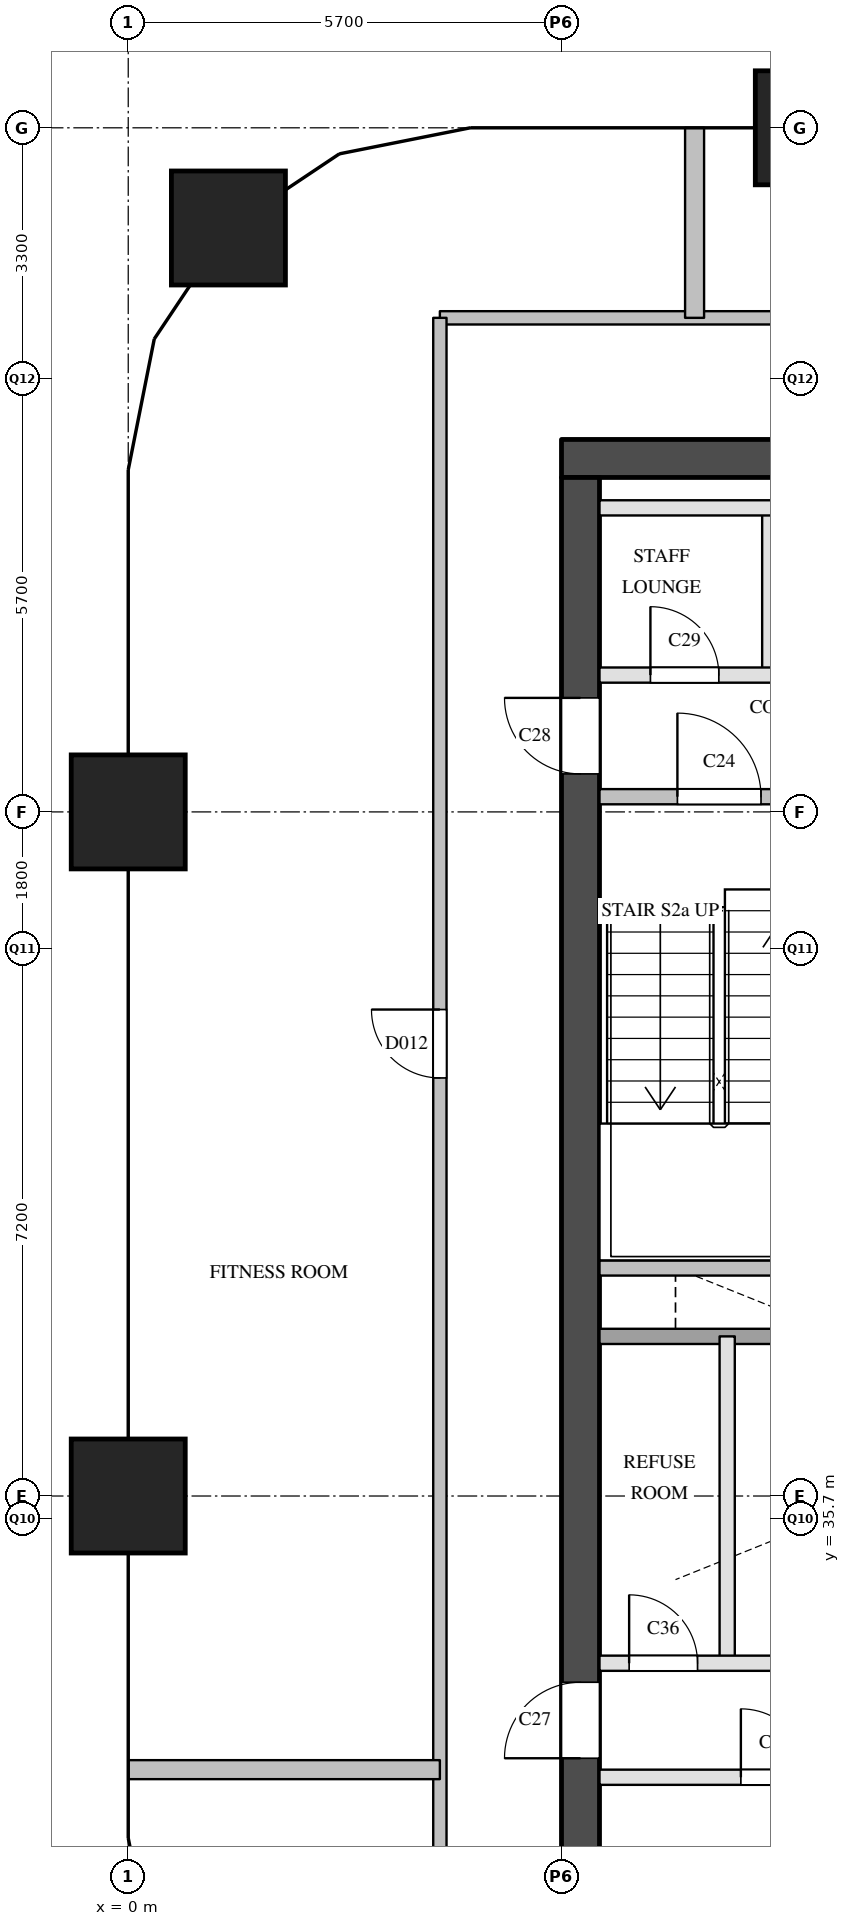
"""IFC4 building model, lengths in metres.
Left out: names, types, materials, properties, quantities, classifications, styles, units other than length and angle.
Written with IfcOpenShell. Run it as: python <this file> out.ifc"""

import sys

from ifc_helpers import new_model, si_unit, direction, frame, frame_2d, origin, origin_2d, place, context, subcontext, project, spatial, rectangle, extrude, element, fill, save


model = new_model("IFC4")
c1 = context("Model", 3, precision=1e-05, world=origin(), true_north=direction((0.0, 1.0)))
c2 = subcontext(c1, "Body", "Model", "MODEL_VIEW")
j1 = project(units=[si_unit("LENGTHUNIT", "METRE"), si_unit("PLANEANGLEUNIT", "RADIAN")], contexts=[c1])
p1 = place(None, origin())
s1 = spatial("IfcSite", under=j1, at=p1, CompositionType="ELEMENT")
p2 = place(p1, origin())
s2 = spatial("IfcBuilding", under=s1, at=p2, CompositionType="ELEMENT")
p3 = place(p2, frame((0.0, 0.0, 193.4)))
s3 = spatial("IfcBuildingStorey", under=s2, at=p3, CompositionType="ELEMENT", Elevation=193.4)
for number, where, z_axis, x_axis in (
    (1, (0.0, 36.0, 0.0), (0.0, 0.0, 1.0), (1.0, 0.0, 0.0)),
    (2, (0.0, 45.0, 0.0), (0.0, 0.0, 1.0), (1.0, 0.0, 0.0)),
    (3, (1.318, 52.682, 0.0), (0.0, 0.0, 1.0), (1.0, 0.0, 0.0)),
    (4, (9.0, 54.0, 0.0), (0.0, 0.0, 1.0), (1.0, 0.0, 0.0)),
):
    element("IfcColumn", number, at=place(p3, frame(where, z_axis=z_axis, x_axis=x_axis)), inside=s3, PredefinedType="COLUMN", context=c2, shape_type="SweptSolid", body=[
        extrude(rectangle(XDim=1.5, YDim=1.5, at=origin_2d()), origin(), (0.0, 0.0, 1.0), 3.9),
    ])
p4 = place(p3, frame((5.7, 49.65, 0.0), z_axis=(0.0, 0.0, 1.0), x_axis=(1.0, 0.0, 0.0)))
e5 = element("IfcWall", 5, at=p4, inside=s3, PredefinedType="SHEAR", context=c2, shape_type="SweptSolid", body=[
    extrude(rectangle(XDim=12.2, YDim=0.5, at=frame_2d((6.1, 0.0))), origin(), (0.0, 0.0, 1.0), 3.4),
])
p5 = place(p3, frame((5.95, 29.1, 0.0), z_axis=(0.0, 0.0, 1.0), x_axis=(0.0, 1.0, 0.0)))
e6 = element("IfcWall", 6, at=p5, inside=s3, PredefinedType="SHEAR", context=c2, shape_type="SweptSolid", body=[
    extrude(rectangle(XDim=20.3, YDim=0.5, at=frame_2d((10.15, 0.0))), origin(), (0.0, 0.0, 1.0), 3.4),
])
p6 = place(p5, frame((3.45, 0.0, 0.0)))
e7 = element("IfcOpeningElement", 7, at=p6, cuts=e6, PredefinedType="OPENING", context=c2, shape_type="SweptSolid", body=[
    extrude(rectangle(XDim=1.0, YDim=2.1, at=frame_2d((0.5, 1.05))), frame((0.0, 0.26, 0.0), z_axis=(0.0, -1.0, 0.0), x_axis=(1.0, 0.0, 0.0)), (0.0, 0.0, 1.0), 0.52),
])
p7 = place(p5, frame((16.4, 0.0, 0.0)))
e8 = element("IfcOpeningElement", 8, at=p7, cuts=e6, PredefinedType="OPENING", context=c2, shape_type="SweptSolid", body=[
    extrude(rectangle(XDim=1.0, YDim=2.1, at=frame_2d((0.5, 1.05))), frame((0.0, 0.26, 0.0), z_axis=(0.0, -1.0, 0.0), x_axis=(1.0, 0.0, 0.0)), (0.0, 0.0, 1.0), 0.52),
])
p8 = place(p3, frame((7.88, 33.8, 0.0), z_axis=(0.0, 0.0, 1.0), x_axis=(0.0, 1.0, 0.0)))
e9 = element("IfcWall", 9, at=p8, inside=s3, PredefinedType="PARTITIONING", context=c2, shape_type="SweptSolid", body=[
    extrude(rectangle(XDim=4.3, YDim=0.2, at=frame_2d((2.15, 0.0))), origin(), (0.0, 0.0, 1.0), 3.4),
])
p9 = place(p3, frame((8.44, 46.8, 0.0), z_axis=(0.0, 0.0, 1.0), x_axis=(0.0, 1.0, 0.0)))
e10 = element("IfcWall", 10, at=p9, inside=s3, PredefinedType="PARTITIONING", context=c2, shape_type="SweptSolid", body=[
    extrude(rectangle(XDim=2.2, YDim=0.2, at=frame_2d((1.1, 0.0))), origin(), (0.0, 0.0, 1.0), 3.4),
])
p10 = place(p3, frame((6.2, 32.3, 0.0), z_axis=(0.0, 0.0, 1.0), x_axis=(1.0, 0.0, 0.0)))
e11 = element("IfcWall", 11, at=p10, inside=s3, PredefinedType="PARTITIONING", context=c2, shape_type="SweptSolid", body=[
    extrude(rectangle(XDim=8.4, YDim=0.2, at=frame_2d((4.2, 0.0))), origin(), (0.0, 0.0, 1.0), 3.4),
])
p11 = place(p10, frame((1.86, 0.0, 0.0)))
e12 = element("IfcOpeningElement", 12, at=p11, cuts=e11, PredefinedType="OPENING", context=c2, shape_type="SweptSolid", body=[
    extrude(rectangle(XDim=0.9, YDim=2.1, at=frame_2d((0.45, 1.05))), frame((0.0, 0.11, 0.0), z_axis=(0.0, -1.0, 0.0), x_axis=(1.0, 0.0, 0.0)), (0.0, 0.0, 1.0), 0.22),
])
p12 = place(p10, frame((6.06, 0.0, 0.0)))
e13 = element("IfcOpeningElement", 13, at=p12, cuts=e11, PredefinedType="OPENING", context=c2, shape_type="SweptSolid", body=[
    extrude(rectangle(XDim=0.9, YDim=2.1, at=frame_2d((0.45, 1.05))), frame((0.0, 0.11, 0.0), z_axis=(0.0, -1.0, 0.0), x_axis=(1.0, 0.0, 0.0)), (0.0, 0.0, 1.0), 0.22),
])
p13 = place(p3, frame((6.2, 33.8, 0.0), z_axis=(0.0, 0.0, 1.0), x_axis=(1.0, 0.0, 0.0)))
e14 = element("IfcWall", 14, at=p13, inside=s3, PredefinedType="PARTITIONING", context=c2, shape_type="SweptSolid", body=[
    extrude(rectangle(XDim=8.4, YDim=0.2, at=frame_2d((4.2, 0.0))), origin(), (0.0, 0.0, 1.0), 3.4),
])
p14 = place(p13, frame((0.39, 0.0, 0.0)))
e15 = element("IfcOpeningElement", 15, at=p14, cuts=e14, PredefinedType="OPENING", context=c2, shape_type="SweptSolid", body=[
    extrude(rectangle(XDim=0.9, YDim=2.1, at=frame_2d((0.45, 1.05))), frame((0.0, 0.11, 0.0), z_axis=(0.0, -1.0, 0.0), x_axis=(1.0, 0.0, 0.0)), (0.0, 0.0, 1.0), 0.22),
])
p15 = place(p13, frame((4.59, 0.0, 0.0)))
e16 = element("IfcOpeningElement", 16, at=p15, cuts=e14, PredefinedType="OPENING", context=c2, shape_type="SweptSolid", body=[
    extrude(rectangle(XDim=0.9, YDim=2.1, at=frame_2d((0.45, 1.05))), frame((0.0, 0.11, 0.0), z_axis=(0.0, -1.0, 0.0), x_axis=(1.0, 0.0, 0.0)), (0.0, 0.0, 1.0), 0.22),
])
p16 = place(p3, frame((6.2, 38.1, 0.0), z_axis=(0.0, 0.0, 1.0), x_axis=(1.0, 0.0, 0.0)))
e17 = element("IfcWall", 17, at=p16, inside=s3, PredefinedType="SOLIDWALL", context=c2, shape_type="SweptSolid", body=[
    extrude(rectangle(XDim=11.2, YDim=0.2, at=frame_2d((5.6, 0.0))), origin(), (0.0, 0.0, 1.0), 3.4),
])
p17 = place(p16, frame((8.85, 0.0, 0.0)))
e18 = element("IfcOpeningElement", 18, at=p17, cuts=e17, PredefinedType="OPENING", context=c2, shape_type="SweptSolid", body=[
    extrude(rectangle(XDim=1.2, YDim=2.1, at=frame_2d((0.6, 1.05))), frame((0.0, 0.11, 0.0), z_axis=(0.0, -1.0, 0.0), x_axis=(1.0, 0.0, 0.0)), (0.0, 0.0, 1.0), 0.22),
])
p18 = place(p3, frame((6.2, 39.0, 0.0), z_axis=(0.0, 0.0, 1.0), x_axis=(1.0, 0.0, 0.0)))
e19 = element("IfcWall", 19, at=p18, inside=s3, PredefinedType="SOLIDWALL", context=c2, shape_type="SweptSolid", body=[
    extrude(rectangle(XDim=3.05, YDim=0.2, at=frame_2d((1.525, 0.0))), origin(), (0.0, 0.0, 1.0), 3.4),
])
p19 = place(p3, frame((6.2, 45.2, 0.0), z_axis=(0.0, 0.0, 1.0), x_axis=(1.0, 0.0, 0.0)))
e20 = element("IfcWall", 20, at=p19, inside=s3, PredefinedType="SOLIDWALL", context=c2, shape_type="SweptSolid", body=[
    extrude(rectangle(XDim=6.3, YDim=0.2, at=frame_2d((3.15, 0.0))), origin(), (0.0, 0.0, 1.0), 3.4),
])
p20 = place(p19, frame((1.025, 0.0, 0.0)))
e21 = element("IfcOpeningElement", 21, at=p20, cuts=e20, PredefinedType="OPENING", context=c2, shape_type="SweptSolid", body=[
    extrude(rectangle(XDim=1.1, YDim=2.1, at=frame_2d((0.55, 1.05))), frame((0.0, 0.11, 0.0), z_axis=(0.0, -1.0, 0.0), x_axis=(1.0, 0.0, 0.0)), (0.0, 0.0, 1.0), 0.22),
])
p21 = place(p19, frame((4.175, 0.0, 0.0)))
e22 = element("IfcOpeningElement", 22, at=p21, cuts=e20, PredefinedType="OPENING", context=c2, shape_type="SweptSolid", body=[
    extrude(rectangle(XDim=1.1, YDim=2.1, at=frame_2d((0.55, 1.05))), frame((0.0, 0.11, 0.0), z_axis=(0.0, -1.0, 0.0), x_axis=(1.0, 0.0, 0.0)), (0.0, 0.0, 1.0), 0.22),
])
p22 = place(p3, frame((6.2, 46.8, 0.0), z_axis=(0.0, 0.0, 1.0), x_axis=(1.0, 0.0, 0.0)))
e23 = element("IfcWall", 23, at=p22, inside=s3, PredefinedType="PARTITIONING", context=c2, shape_type="SweptSolid", body=[
    extrude(rectangle(XDim=11.2, YDim=0.2, at=frame_2d((5.6, 0.0))), origin(), (0.0, 0.0, 1.0), 3.4),
])
p23 = place(p22, frame((0.67, 0.0, 0.0)))
e24 = element("IfcOpeningElement", 24, at=p23, cuts=e23, PredefinedType="OPENING", context=c2, shape_type="SweptSolid", body=[
    extrude(rectangle(XDim=0.9, YDim=2.1, at=frame_2d((0.45, 1.05))), frame((0.0, 0.11, 0.0), z_axis=(0.0, -1.0, 0.0), x_axis=(1.0, 0.0, 0.0)), (0.0, 0.0, 1.0), 0.22),
])
p24 = place(p22, frame((4.59, 0.0, 0.0)))
e25 = element("IfcOpeningElement", 25, at=p24, cuts=e23, PredefinedType="OPENING", context=c2, shape_type="SweptSolid", body=[
    extrude(rectangle(XDim=0.9, YDim=2.1, at=frame_2d((0.45, 1.05))), frame((0.0, 0.11, 0.0), z_axis=(0.0, -1.0, 0.0), x_axis=(1.0, 0.0, 0.0)), (0.0, 0.0, 1.0), 0.22),
])
p25 = place(p22, frame((9.07, 0.0, 0.0)))
e26 = element("IfcOpeningElement", 26, at=p25, cuts=e23, PredefinedType="OPENING", context=c2, shape_type="SweptSolid", body=[
    extrude(rectangle(XDim=0.9, YDim=2.1, at=frame_2d((0.45, 1.05))), frame((0.0, 0.11, 0.0), z_axis=(0.0, -1.0, 0.0), x_axis=(1.0, 0.0, 0.0)), (0.0, 0.0, 1.0), 0.22),
])
p26 = place(p3, frame((6.2, 49.0, 0.0), z_axis=(0.0, 0.0, 1.0), x_axis=(1.0, 0.0, 0.0)))
e27 = element("IfcWall", 27, at=p26, inside=s3, PredefinedType="PARTITIONING", context=c2, shape_type="SweptSolid", body=[
    extrude(rectangle(XDim=11.2, YDim=0.2, at=frame_2d((5.6, 0.0))), origin(), (0.0, 0.0, 1.0), 3.4),
])
p27 = place(p3, frame((4.1, 51.5, 0.0), z_axis=(0.0, 0.0, 1.0), x_axis=(1.0, 0.0, 0.0)))
e28 = element("IfcWall", 28, at=p27, inside=s3, PredefinedType="PARTITIONING", context=c2, shape_type="SweptSolid", body=[
    extrude(rectangle(XDim=15.4, YDim=0.175, at=frame_2d((7.7, 0.0))), origin(), (0.0, 0.0, 1.0), 3.4),
])
p28 = place(p27, frame((7.333, 0.0, 0.0)))
e29 = element("IfcOpeningElement", 29, at=p28, cuts=e28, PredefinedType="OPENING", context=c2, shape_type="SweptSolid", body=[
    extrude(rectangle(XDim=1.0, YDim=2.1, at=frame_2d((0.5, 1.05))), frame((0.0, 0.097, 0.0), z_axis=(0.0, -1.0, 0.0), x_axis=(1.0, 0.0, 0.0)), (0.0, 0.0, 1.0), 0.195),
])
p29 = place(p3, frame((4.1, 28.5, 0.0), z_axis=(0.0, 0.0, 1.0), x_axis=(0.0, 1.0, 0.0)))
e30 = element("IfcWall", 30, at=p29, inside=s3, PredefinedType="PARTITIONING", context=c2, shape_type="SweptSolid", body=[
    extrude(rectangle(XDim=23.0, YDim=0.175, at=frame_2d((11.5, 0.0))), origin(), (0.0, 0.0, 1.0), 3.4),
])
p30 = place(p29, frame((1.5, 0.0, 0.0)))
e31 = element("IfcOpeningElement", 31, at=p30, cuts=e30, PredefinedType="OPENING", context=c2, shape_type="SweptSolid", body=[
    extrude(rectangle(XDim=0.9, YDim=2.1, at=frame_2d((0.45, 1.05))), frame((0.0, 0.097, 0.0), z_axis=(0.0, -1.0, 0.0), x_axis=(1.0, 0.0, 0.0)), (0.0, 0.0, 1.0), 0.195),
])
p31 = place(p29, frame((13.0, 0.0, 0.0)))
e32 = element("IfcOpeningElement", 32, at=p31, cuts=e30, PredefinedType="OPENING", context=c2, shape_type="SweptSolid", body=[
    extrude(rectangle(XDim=0.9, YDim=2.1, at=frame_2d((0.45, 1.05))), frame((0.0, 0.097, 0.0), z_axis=(0.0, -1.0, 0.0), x_axis=(1.0, 0.0, 0.0)), (0.0, 0.0, 1.0), 0.195),
])
p32 = place(p3, frame((0.0, 32.4, 0.0), z_axis=(0.0, 0.0, 1.0), x_axis=(1.0, 0.0, 0.0)))
e33 = element("IfcWall", 33, at=p32, inside=s3, PredefinedType="PARTITIONING", context=c2, shape_type="SweptSolid", body=[
    extrude(rectangle(XDim=4.1, YDim=0.25, at=frame_2d((2.05, 0.0))), origin(), (0.0, 0.0, 1.0), 2.4),
])
p33 = place(p3, frame((7.451, 51.5, 0.0), z_axis=(0.0, 0.0, 1.0), x_axis=(0.0, 1.0, 0.0)))
e34 = element("IfcWall", 34, at=p33, inside=s3, PredefinedType="PARTITIONING", context=c2, shape_type="SweptSolid", body=[
    extrude(rectangle(XDim=2.5, YDim=0.25, at=frame_2d((1.25, 0.0))), origin(), (0.0, 0.0, 1.0), 2.4),
])
p34 = place(p20, origin())
e35 = element("IfcDoor", 35, at=p34, inside=s3, OperationType="SINGLE_SWING_LEFT", PredefinedType="DOOR", context=c2, shape_type="SweptSolid", body=[
    extrude(rectangle(XDim=1.1, YDim=2.1, at=frame_2d((0.55, 1.05))), frame((0.0, 0.025, 0.0), z_axis=(0.0, -1.0, 0.0), x_axis=(1.0, 0.0, 0.0)), (0.0, 0.0, 1.0), 0.05),
])
fill(e21, e35)
p35 = place(p6, origin())
e36 = element("IfcDoor", 36, at=p35, inside=s3, OperationType="SINGLE_SWING_LEFT", PredefinedType="DOOR", context=c2, shape_type="SweptSolid", body=[
    extrude(rectangle(XDim=1.0, YDim=2.1, at=frame_2d((0.5, 1.05))), frame((0.0, 0.025, 0.0), z_axis=(0.0, -1.0, 0.0), x_axis=(1.0, 0.0, 0.0)), (0.0, 0.0, 1.0), 0.05),
])
fill(e7, e36)
p36 = place(p7, origin())
e37 = element("IfcDoor", 37, at=p36, inside=s3, OperationType="SINGLE_SWING_RIGHT", PredefinedType="DOOR", context=c2, shape_type="SweptSolid", body=[
    extrude(rectangle(XDim=1.0, YDim=2.1, at=frame_2d((0.5, 1.05))), frame((0.0, 0.025, 0.0), z_axis=(0.0, -1.0, 0.0), x_axis=(1.0, 0.0, 0.0)), (0.0, 0.0, 1.0), 0.05),
])
fill(e8, e37)
p37 = place(p23, origin())
e38 = element("IfcDoor", 38, at=p37, inside=s3, OperationType="SINGLE_SWING_LEFT", PredefinedType="DOOR", context=c2, shape_type="SweptSolid", body=[
    extrude(rectangle(XDim=0.9, YDim=2.1, at=frame_2d((0.45, 1.05))), frame((0.0, 0.025, 0.0), z_axis=(0.0, -1.0, 0.0), x_axis=(1.0, 0.0, 0.0)), (0.0, 0.0, 1.0), 0.05),
])
fill(e24, e38)
p38 = place(p11, origin())
e39 = element("IfcDoor", 39, at=p38, inside=s3, OperationType="SINGLE_SWING_LEFT", PredefinedType="DOOR", context=c2, shape_type="SweptSolid", body=[
    extrude(rectangle(XDim=0.9, YDim=2.1, at=frame_2d((0.45, 1.05))), frame((0.0, 0.025, 0.0), z_axis=(0.0, -1.0, 0.0), x_axis=(1.0, 0.0, 0.0)), (0.0, 0.0, 1.0), 0.05),
])
fill(e12, e39)
p39 = place(p14, origin())
e40 = element("IfcDoor", 40, at=p39, inside=s3, OperationType="SINGLE_SWING_LEFT", PredefinedType="DOOR", context=c2, shape_type="SweptSolid", body=[
    extrude(rectangle(XDim=0.9, YDim=2.1, at=frame_2d((0.45, 1.05))), frame((0.0, 0.025, 0.0), z_axis=(0.0, -1.0, 0.0), x_axis=(1.0, 0.0, 0.0)), (0.0, 0.0, 1.0), 0.05),
])
fill(e15, e40)
p40 = place(p31, origin())
e41 = element("IfcDoor", 41, at=p40, inside=s3, OperationType="SINGLE_SWING_RIGHT", PredefinedType="DOOR", context=c2, shape_type="SweptSolid", body=[
    extrude(rectangle(XDim=0.9, YDim=2.1, at=frame_2d((0.45, 1.05))), frame((0.0, 0.025, 0.0), z_axis=(0.0, -1.0, 0.0), x_axis=(1.0, 0.0, 0.0)), (0.0, 0.0, 1.0), 0.05),
])
fill(e32, e41)
save(model, sys.argv[1])
